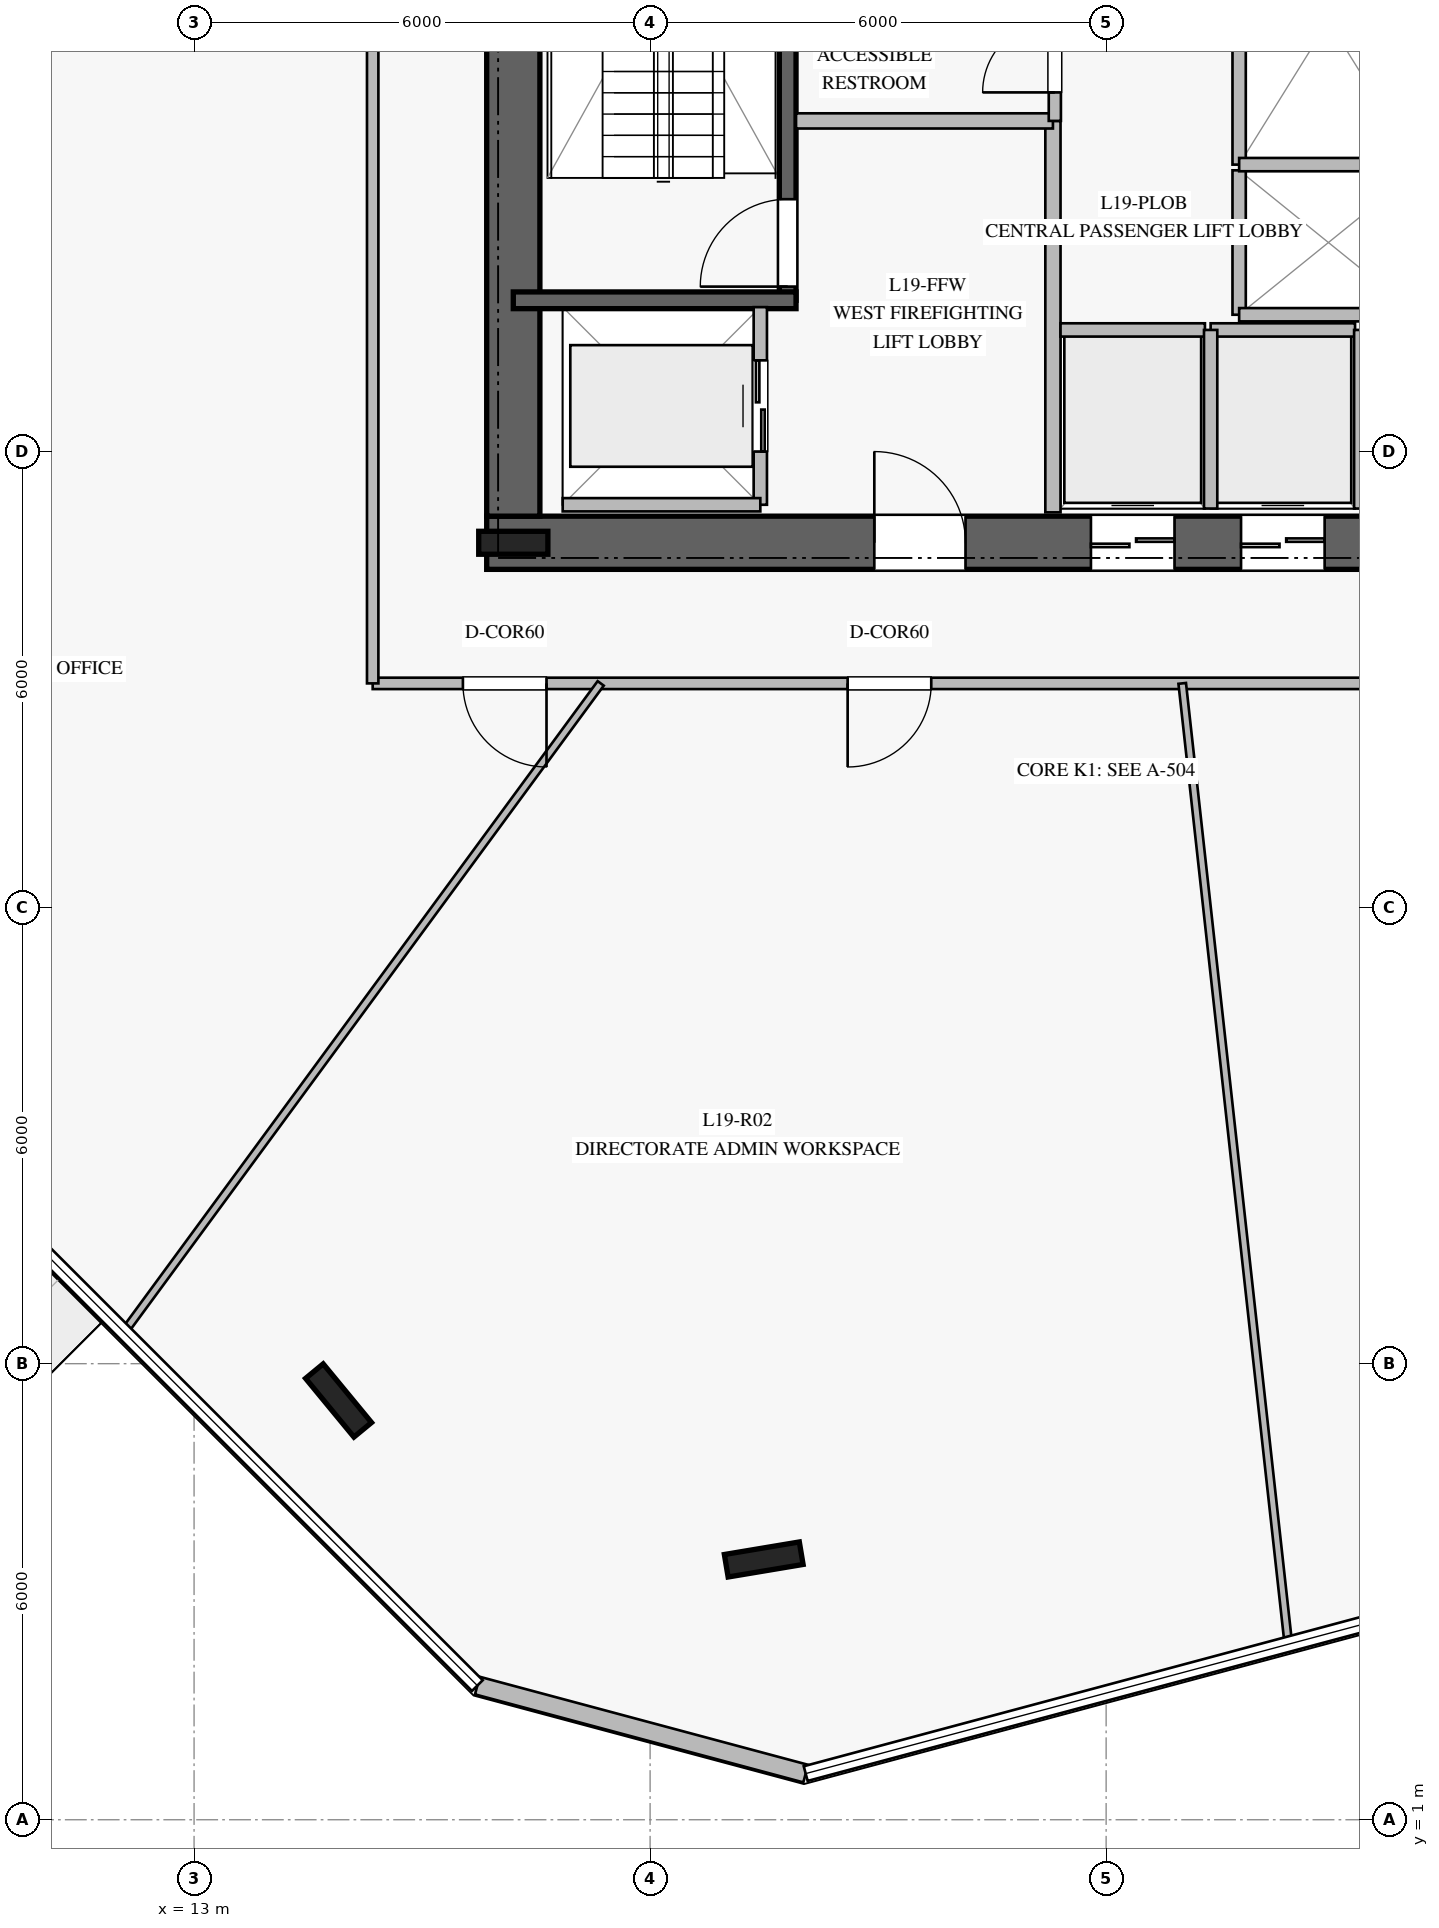
"""IFC4 building model, lengths in metres.
Left out: names, types, materials, properties, quantities, classifications, styles, units other than length and angle.
Written with IfcOpenShell. Run it as: python <this file> out.ifc"""

import sys

from ifc_helpers import new_model, si_unit, direction, frame, frame_2d, origin, origin_2d, place, context, subcontext, project, spatial, rectangle, i_section, extrude, element, fill, save


model = new_model("IFC4")
c1 = context("Model", 3, precision=1e-05, world=origin(), true_north=direction((0.0, 1.0)))
c2 = subcontext(c1, "Body", "Model", "MODEL_VIEW")
j1 = project(units=[si_unit("LENGTHUNIT", "METRE"), si_unit("PLANEANGLEUNIT", "RADIAN")], contexts=[c1])
p1 = place(None, origin())
s1 = spatial("IfcSite", under=j1, at=p1, CompositionType="ELEMENT")
p2 = place(p1, origin())
s2 = spatial("IfcBuilding", under=s1, at=p2, CompositionType="ELEMENT")
p3 = place(p2, frame((0.0, 0.0, 80.0)))
s3 = spatial("IfcBuildingStorey", under=s2, at=p3, CompositionType="ELEMENT", Elevation=80.0)
p4 = place(p3, frame((16.85, 17.8, 0.0), z_axis=(0.0, 0.0, 1.0), x_axis=(1.0, 0.0, 0.0)))
e1 = element("IfcWall", 1, at=p4, inside=s3, PredefinedType="SHEAR", context=c2, shape_type="SweptSolid", body=[
    extrude(rectangle(XDim=16.3, YDim=0.7, at=frame_2d((8.15, 0.0))), origin(), (0.0, 0.0, 1.0), 3.76),
])
p5 = place(p4, frame((5.1, 0.0, 0.0)))
e2 = element("IfcOpeningElement", 2, at=p5, cuts=e1, PredefinedType="OPENING", context=c2, shape_type="SweptSolid", body=[
    extrude(rectangle(XDim=1.2, YDim=2.25, at=frame_2d((0.6, 1.125))), frame((0.0, 0.36, 0.0), z_axis=(0.0, -1.0, 0.0), x_axis=(1.0, 0.0, 0.0)), (0.0, 0.0, 1.0), 0.72),
])
p6 = place(p4, frame((14.05, 0.0, 0.0)))
e3 = element("IfcOpeningElement", 3, at=p6, cuts=e1, PredefinedType="OPENING", context=c2, shape_type="SweptSolid", body=[
    extrude(rectangle(XDim=0.9, YDim=2.1, at=frame_2d((0.45, 1.05))), frame((0.0, 0.36, 0.0), z_axis=(0.0, -1.0, 0.0), x_axis=(1.0, 0.0, 0.0)), (0.0, 0.0, 1.0), 0.72),
])
p7 = place(p4, frame((7.95, 0.0, 0.0)))
e4 = element("IfcOpeningElement", 4, at=p7, cuts=e1, PredefinedType="OPENING", context=c2, shape_type="SweptSolid", body=[
    extrude(rectangle(XDim=1.1, YDim=2.2, at=frame_2d((0.55, 1.1))), frame((0.0, 0.36, 0.0), z_axis=(0.0, -1.0, 0.0), x_axis=(1.0, 0.0, 0.0)), (0.0, 0.0, 1.0), 0.72),
])
p8 = place(p4, frame((9.925, 0.0, 0.0)))
e5 = element("IfcOpeningElement", 5, at=p8, cuts=e1, PredefinedType="OPENING", context=c2, shape_type="SweptSolid", body=[
    extrude(rectangle(XDim=1.1, YDim=2.2, at=frame_2d((0.55, 1.1))), frame((0.0, 0.36, 0.0), z_axis=(0.0, -1.0, 0.0), x_axis=(1.0, 0.0, 0.0)), (0.0, 0.0, 1.0), 0.72),
])
p9 = place(p4, frame((11.9, 0.0, 0.0)))
e6 = element("IfcOpeningElement", 6, at=p9, cuts=e1, PredefinedType="OPENING", context=c2, shape_type="SweptSolid", body=[
    extrude(rectangle(XDim=1.1, YDim=2.2, at=frame_2d((0.55, 1.1))), frame((0.0, 0.36, 0.0), z_axis=(0.0, -1.0, 0.0), x_axis=(1.0, 0.0, 0.0)), (0.0, 0.0, 1.0), 0.72),
])
p10 = place(p3, frame((17.2, 31.85, 0.0), z_axis=(0.0, 0.0, 1.0), x_axis=(0.0, -1.0, 0.0)))
e7 = element("IfcWall", 7, at=p10, inside=s3, PredefinedType="SHEAR", context=c2, shape_type="SweptSolid", body=[
    extrude(rectangle(XDim=13.7, YDim=0.7, at=frame_2d((6.85, 0.0))), origin(), (0.0, 0.0, 1.0), 3.76),
])
p11 = place(p10, frame((2.0, 0.0, 0.0)))
e8 = element("IfcOpeningElement", 8, at=p11, cuts=e7, PredefinedType="OPENING", context=c2, shape_type="SweptSolid", body=[
    extrude(rectangle(XDim=1.5, YDim=2.2, at=frame_2d((0.75, 1.1))), frame((0.0, 0.36, 0.0), z_axis=(0.0, -1.0, 0.0), x_axis=(1.0, 0.0, 0.0)), (0.0, 0.0, 1.0), 0.72),
])
p12 = place(p3, frame((17.2, 17.8, 0.0), z_axis=(0.0, 0.0, 1.0), x_axis=(1.0, 0.0, 0.0)))
e9 = element("IfcColumn", 9, at=p12, inside=s3, PredefinedType="COLUMN", context=c2, shape_type="SweptSolid", body=[
    extrude(i_section(OverallWidth=0.302, OverallDepth=0.91, WebThickness=0.021, FlangeThickness=0.04, at=origin_2d()), origin(), (0.0, 0.0, 1.0), 4.0),
])
p13 = place(p3, frame((20.81, 20.99, 0.0), z_axis=(0.0, 0.0, 1.0), x_axis=(0.0, 1.0, 0.0)))
e10 = element("IfcWall", 10, at=p13, inside=s3, PredefinedType="SOLIDWALL", context=c2, shape_type="SweptSolid", body=[
    extrude(rectangle(XDim=7.22, YDim=0.22, at=frame_2d((3.61, 0.0))), origin(), (0.0, 0.0, 1.0), 3.76),
])
p14 = place(p13, frame((0.18, 0.0, 0.0)))
e11 = element("IfcOpeningElement", 11, at=p14, cuts=e10, PredefinedType="OPENING", context=c2, shape_type="SweptSolid", body=[
    extrude(rectangle(XDim=1.15, YDim=2.2, at=frame_2d((0.575, 1.1))), frame((0.0, 0.12, 0.0), z_axis=(0.0, -1.0, 0.0), x_axis=(1.0, 0.0, 0.0)), (0.0, 0.0, 1.0), 0.24),
])
p15 = place(p3, frame((17.2, 20.99, 0.0), z_axis=(0.0, 0.0, 1.0), x_axis=(1.0, 0.0, 0.0)))
e12 = element("IfcWall", 12, at=p15, inside=s3, PredefinedType="SOLIDWALL", context=c2, shape_type="SweptSolid", body=[
    extrude(rectangle(XDim=3.72, YDim=0.22, at=frame_2d((1.86, 0.0))), origin(), (0.0, 0.0, 1.0), 3.76),
])
for number, where, z_axis, x_axis in (
    (13, (14.901, 6.516, 0.0), (0.0, 0.0, 1.0), (-0.636, 0.772, 0.0)),
    (14, (20.495, 4.424, 0.0), (0.0, 0.0, 1.0), (0.986, 0.165, 0.0)),
):
    element("IfcColumn", number, at=place(p3, frame(where, z_axis=z_axis, x_axis=x_axis)), inside=s3, PredefinedType="COLUMN", context=c2, shape_type="SweptSolid", body=[
        extrude(i_section(OverallWidth=0.3, OverallDepth=1.0, WebThickness=0.019, FlangeThickness=0.036, at=origin_2d()), origin(), (0.0, 0.0, 1.0), 4.0),
    ])
p16 = place(p3, frame((16.727, 2.765, 0.0), z_axis=(0.0, 0.0, 1.0), x_axis=(0.965903455427, -0.258902519869, 0.0)))
e15 = element("IfcWall", 15, at=p16, inside=s3, PredefinedType="STANDARD", context=c2, shape_type="SweptSolid", body=[
    extrude(rectangle(XDim=4.473, YDim=0.24, at=frame_2d((2.236, 0.0))), origin(), (0.0, 0.0, 1.0), 3.76),
])
p17 = place(p3, frame((24.3, 18.2, 0.0), z_axis=(0.0, 0.0, 1.0), x_axis=(0.0, 1.0, 0.0)))
e16 = element("IfcWall", 16, at=p17, inside=s3, PredefinedType="PARTITIONING", context=c2, shape_type="SweptSolid", body=[
    extrude(rectangle(XDim=5.15, YDim=0.2, at=frame_2d((2.575, 0.0))), origin(), (0.0, 0.0, 1.0), 3.76),
])
p18 = place(p3, frame((20.92, 23.35, 0.0), z_axis=(0.0, 0.0, 1.0), x_axis=(1.0, 0.0, 0.0)))
e17 = element("IfcWall", 17, at=p18, inside=s3, PredefinedType="PARTITIONING", context=c2, shape_type="SweptSolid", body=[
    extrude(rectangle(XDim=3.38, YDim=0.2, at=frame_2d((1.69, 0.0))), origin(), (0.0, 0.0, 1.0), 3.76),
])
p19 = place(p3, frame((24.325, 23.35, 0.0), z_axis=(0.0, 0.0, 1.0), x_axis=(0.0, 1.0, 0.0)))
e18 = element("IfcWall", 18, at=p19, inside=s3, PredefinedType="PLUMBINGWALL", context=c2, shape_type="SweptSolid", body=[
    extrude(rectangle(XDim=4.93, YDim=0.16, at=frame_2d((2.465, 0.0))), origin(), (0.0, 0.0, 1.0), 3.76),
])
p20 = place(p19, frame((0.375, 0.0, 0.0)))
e19 = element("IfcOpeningElement", 19, at=p20, cuts=e18, PredefinedType="OPENING", context=c2, shape_type="SweptSolid", body=[
    extrude(rectangle(XDim=0.95, YDim=2.1, at=frame_2d((0.475, 1.05))), frame((0.0, 0.09, 0.0), z_axis=(0.0, -1.0, 0.0), x_axis=(1.0, 0.0, 0.0)), (0.0, 0.0, 1.0), 0.18),
])
p21 = place(p19, frame((2.035, 0.0, 0.0)))
e20 = element("IfcOpeningElement", 20, at=p21, cuts=e18, PredefinedType="OPENING", context=c2, shape_type="SweptSolid", body=[
    extrude(rectangle(XDim=0.9, YDim=2.1, at=frame_2d((0.45, 1.05))), frame((0.0, 0.09, 0.0), z_axis=(0.0, -1.0, 0.0), x_axis=(1.0, 0.0, 0.0)), (0.0, 0.0, 1.0), 0.18),
])
p22 = place(p19, frame((3.66, 0.0, 0.0)))
e21 = element("IfcOpeningElement", 21, at=p22, cuts=e18, PredefinedType="OPENING", context=c2, shape_type="SweptSolid", body=[
    extrude(rectangle(XDim=0.9, YDim=2.1, at=frame_2d((0.45, 1.05))), frame((0.0, 0.09, 0.0), z_axis=(0.0, -1.0, 0.0), x_axis=(1.0, 0.0, 0.0)), (0.0, 0.0, 1.0), 0.18),
])
p23 = place(p3, frame((24.4, 20.6, 0.0), z_axis=(0.0, 0.0, 1.0), x_axis=(1.0, 0.0, 0.0)))
e22 = element("IfcWall", 22, at=p23, inside=s3, PredefinedType="PARTITIONING", context=c2, shape_type="SweptSolid", body=[
    extrude(rectangle(XDim=1.9, YDim=0.175, at=frame_2d((0.95, 0.0))), origin(), (0.0, 0.0, 1.0), 3.76),
])
p24 = place(p3, frame((26.375, 20.6, 0.0), z_axis=(0.0, 0.0, 1.0), x_axis=(1.0, 0.0, 0.0)))
e23 = element("IfcWall", 23, at=p24, inside=s3, PredefinedType="PARTITIONING", context=c2, shape_type="SweptSolid", body=[
    extrude(rectangle(XDim=1.9, YDim=0.175, at=frame_2d((0.95, 0.0))), origin(), (0.0, 0.0, 1.0), 3.76),
])
for number, where, z_axis, x_axis in (
    (24, (26.375, 18.25, 0.0), (0.0, 0.0, 1.0), (0.0, 1.0, 0.0)),
    (25, (28.35, 18.25, 0.0), (0.0, 0.0, 1.0), (0.0, 1.0, 0.0)),
):
    element("IfcWall", number, at=place(p3, frame(where, z_axis=z_axis, x_axis=x_axis)), inside=s3, PredefinedType="PARTITIONING", context=c2, shape_type="SweptSolid", body=[
        extrude(rectangle(XDim=2.35, YDim=0.175, at=frame_2d((1.175, 0.0))), origin(), (0.0, 0.0, 1.0), 3.76),
    ])
p25 = place(p3, frame((26.75, 20.8, 0.0), z_axis=(0.0, 0.0, 1.0), x_axis=(0.0, 1.0, 0.0)))
e26 = element("IfcWall", 26, at=p25, inside=s3, PredefinedType="PARTITIONING", context=c2, shape_type="SweptSolid", body=[
    extrude(rectangle(XDim=1.9, YDim=0.175, at=frame_2d((0.95, 0.0))), origin(), (0.0, 0.0, 1.0), 3.76),
])
p26 = place(p3, frame((26.75, 20.8, 0.0), z_axis=(0.0, 0.0, 1.0), x_axis=(1.0, 0.0, 0.0)))
e27 = element("IfcWall", 27, at=p26, inside=s3, PredefinedType="PARTITIONING", context=c2, shape_type="SweptSolid", body=[
    extrude(rectangle(XDim=2.35, YDim=0.175, at=frame_2d((1.175, 0.0))), origin(), (0.0, 0.0, 1.0), 3.76),
])
p27 = place(p3, frame((26.75, 22.775, 0.0), z_axis=(0.0, 0.0, 1.0), x_axis=(0.0, 1.0, 0.0)))
e28 = element("IfcWall", 28, at=p27, inside=s3, PredefinedType="PARTITIONING", context=c2, shape_type="SweptSolid", body=[
    extrude(rectangle(XDim=1.9, YDim=0.175, at=frame_2d((0.95, 0.0))), origin(), (0.0, 0.0, 1.0), 3.76),
])
p28 = place(p3, frame((26.75, 22.775, 0.0), z_axis=(0.0, 0.0, 1.0), x_axis=(1.0, 0.0, 0.0)))
e29 = element("IfcWall", 29, at=p28, inside=s3, PredefinedType="PARTITIONING", context=c2, shape_type="SweptSolid", body=[
    extrude(rectangle(XDim=2.35, YDim=0.175, at=frame_2d((1.175, 0.0))), origin(), (0.0, 0.0, 1.0), 3.76),
])
p29 = place(p3, frame((20.45, 18.3, 0.0), z_axis=(0.0, 0.0, 1.0), x_axis=(0.0, 1.0, 0.0)))
e30 = element("IfcWall", 30, at=p29, inside=s3, PredefinedType="PARTITIONING", context=c2, shape_type="SweptSolid", body=[
    extrude(rectangle(XDim=2.6, YDim=0.175, at=frame_2d((1.3, 0.0))), origin(), (0.0, 0.0, 1.0), 3.76),
])
p30 = place(p29, frame((0.7, 0.0, 0.0)))
e31 = element("IfcOpeningElement", 31, at=p30, cuts=e30, PredefinedType="OPENING", context=c2, shape_type="SweptSolid", body=[
    extrude(rectangle(XDim=1.2, YDim=2.2, at=frame_2d((0.6, 1.1))), frame((0.0, 0.098, 0.0), z_axis=(0.0, -1.0, 0.0), x_axis=(1.0, 0.0, 0.0)), (0.0, 0.0, 1.0), 0.195),
])
p31 = place(p3, frame((17.85, 18.3, 0.0), z_axis=(0.0, 0.0, 1.0), x_axis=(1.0, 0.0, 0.0)))
e32 = element("IfcWall", 32, at=p31, inside=s3, PredefinedType="PARTITIONING", context=c2, shape_type="SweptSolid", body=[
    extrude(rectangle(XDim=2.6, YDim=0.175, at=frame_2d((1.3, 0.0))), origin(), (0.0, 0.0, 1.0), 3.76),
])
p32 = place(p3, frame((34.65, 15.95, 0.0), z_axis=(0.0, 0.0, 1.0), x_axis=(-1.0, 0.0, 0.0)))
e33 = element("IfcWall", 33, at=p32, inside=s3, PredefinedType="PARTITIONING", context=c2, shape_type="SweptSolid", body=[
    extrude(rectangle(XDim=19.3, YDim=0.15, at=frame_2d((9.65, 0.0))), origin(), (0.0, 0.0, 1.0), 3.21),
])
p33 = place(p32, frame((17.013, 0.0, 0.0)))
e34 = element("IfcOpeningElement", 34, at=p33, cuts=e33, PredefinedType="OPENING", context=c2, shape_type="SweptSolid", body=[
    extrude(rectangle(XDim=1.1, YDim=2.2, at=frame_2d((0.55, 1.1))), frame((0.0, 0.085, 0.0), z_axis=(0.0, -1.0, 0.0), x_axis=(1.0, 0.0, 0.0)), (0.0, 0.0, 1.0), 0.17),
])
p34 = place(p32, frame((11.951, 0.0, 0.0)))
e35 = element("IfcOpeningElement", 35, at=p34, cuts=e33, PredefinedType="OPENING", context=c2, shape_type="SweptSolid", body=[
    extrude(rectangle(XDim=1.1, YDim=2.2, at=frame_2d((0.55, 1.1))), frame((0.0, 0.085, 0.0), z_axis=(0.0, -1.0, 0.0), x_axis=(1.0, 0.0, 0.0)), (0.0, 0.0, 1.0), 0.17),
])
p35 = place(p3, frame((15.35, 15.95, 0.0), z_axis=(0.0, 0.0, 1.0), x_axis=(0.0, 1.0, 0.0)))
e36 = element("IfcWall", 36, at=p35, inside=s3, PredefinedType="PARTITIONING", context=c2, shape_type="SweptSolid", body=[
    extrude(rectangle(XDim=18.1, YDim=0.15, at=frame_2d((9.05, 0.0))), origin(), (0.0, 0.0, 1.0), 3.21),
])
p36 = place(p35, frame((12.932, 0.0, 0.0)))
e37 = element("IfcOpeningElement", 37, at=p36, cuts=e36, PredefinedType="OPENING", context=c2, shape_type="SweptSolid", body=[
    extrude(rectangle(XDim=1.1, YDim=2.2, at=frame_2d((0.55, 1.1))), frame((0.0, 0.085, 0.0), z_axis=(0.0, -1.0, 0.0), x_axis=(1.0, 0.0, 0.0)), (0.0, 0.0, 1.0), 0.17),
])
p37 = place(p3, frame((18.35, 15.95, 0.0), z_axis=(0.0, 0.0, 1.0), x_axis=(-0.592192095979, -0.805796823932, 0.0)))
e38 = element("IfcWall", 38, at=p37, inside=s3, PredefinedType="MOVABLE", context=c2, shape_type="SweptSolid", body=[
    extrude(rectangle(XDim=10.575, YDim=0.1, at=frame_2d((5.287, 0.0))), origin(), (0.0, 0.0, 1.0), 3.05),
])
p38 = place(p3, frame((26.001, 15.95, 0.0), z_axis=(0.0, 0.0, 1.0), x_axis=(0.109844945692, -0.993948735049, 0.0)))
e39 = element("IfcWall", 39, at=p38, inside=s3, PredefinedType="MOVABLE", context=c2, shape_type="SweptSolid", body=[
    extrude(rectangle(XDim=12.7, YDim=0.1, at=frame_2d((6.35, 0.0))), origin(), (0.0, 0.0, 1.0), 3.06),
])
p39 = place(p14, origin())
e40 = element("IfcDoor", 40, at=p39, inside=s3, OperationType="SINGLE_SWING_LEFT", PredefinedType="DOOR", context=c2, shape_type="SweptSolid", body=[
    extrude(rectangle(XDim=1.15, YDim=2.2, at=frame_2d((0.575, 1.1))), frame((0.0, 0.025, 0.0), z_axis=(0.0, -1.0, 0.0), x_axis=(1.0, 0.0, 0.0)), (0.0, 0.0, 1.0), 0.05),
])
fill(e11, e40)
p40 = place(p5, origin())
e41 = element("IfcDoor", 41, at=p40, inside=s3, OperationType="SINGLE_SWING_LEFT", PredefinedType="DOOR", context=c2, shape_type="SweptSolid", body=[
    extrude(rectangle(XDim=1.2, YDim=2.25, at=frame_2d((0.6, 1.125))), frame((0.0, 0.025, 0.0), z_axis=(0.0, -1.0, 0.0), x_axis=(1.0, 0.0, 0.0)), (0.0, 0.0, 1.0), 0.05),
])
fill(e2, e41)
p41 = place(p20, origin())
e42 = element("IfcDoor", 42, at=p41, inside=s3, OperationType="SINGLE_SWING_LEFT", PredefinedType="DOOR", context=c2, shape_type="SweptSolid", body=[
    extrude(rectangle(XDim=0.95, YDim=2.1, at=frame_2d((0.475, 1.05))), frame((0.0, 0.025, 0.0), z_axis=(0.0, -1.0, 0.0), x_axis=(1.0, 0.0, 0.0)), (0.0, 0.0, 1.0), 0.05),
])
fill(e19, e42)
p42 = place(p7, origin())
e43 = element("IfcDoor", 43, at=p42, inside=s3, OperationType="DOUBLE_DOOR_SLIDING", PredefinedType="DOOR", context=c2, shape_type="SweptSolid", body=[
    extrude(rectangle(XDim=1.1, YDim=2.2, at=frame_2d((0.55, 1.1))), frame((0.0, 0.025, 0.0), z_axis=(0.0, -1.0, 0.0), x_axis=(1.0, 0.0, 0.0)), (0.0, 0.0, 1.0), 0.05),
])
fill(e4, e43)
p43 = place(p8, origin())
e44 = element("IfcDoor", 44, at=p43, inside=s3, OperationType="DOUBLE_DOOR_SLIDING", PredefinedType="DOOR", context=c2, shape_type="SweptSolid", body=[
    extrude(rectangle(XDim=1.1, YDim=2.2, at=frame_2d((0.55, 1.1))), frame((0.0, 0.025, 0.0), z_axis=(0.0, -1.0, 0.0), x_axis=(1.0, 0.0, 0.0)), (0.0, 0.0, 1.0), 0.05),
])
fill(e5, e44)
p44 = place(p30, origin())
e45 = element("IfcDoor", 45, at=p44, inside=s3, OperationType="DOUBLE_DOOR_SLIDING", PredefinedType="DOOR", context=c2, shape_type="SweptSolid", body=[
    extrude(rectangle(XDim=1.2, YDim=2.2, at=frame_2d((0.6, 1.1))), frame((0.0, 0.025, 0.0), z_axis=(0.0, -1.0, 0.0), x_axis=(1.0, 0.0, 0.0)), (0.0, 0.0, 1.0), 0.05),
])
fill(e31, e45)
p45 = place(p33, origin())
e46 = element("IfcDoor", 46, at=p45, inside=s3, OperationType="SINGLE_SWING_LEFT", PredefinedType="DOOR", context=c2, shape_type="SweptSolid", body=[
    extrude(rectangle(XDim=1.1, YDim=2.2, at=frame_2d((0.55, 1.1))), frame((0.0, 0.025, 0.0), z_axis=(0.0, -1.0, 0.0), x_axis=(1.0, 0.0, 0.0)), (0.0, 0.0, 1.0), 0.05),
])
fill(e34, e46)
p46 = place(p34, origin())
e47 = element("IfcDoor", 47, at=p46, inside=s3, OperationType="SINGLE_SWING_RIGHT", PredefinedType="DOOR", context=c2, shape_type="SweptSolid", body=[
    extrude(rectangle(XDim=1.1, YDim=2.2, at=frame_2d((0.55, 1.1))), frame((0.0, 0.025, 0.0), z_axis=(0.0, -1.0, 0.0), x_axis=(1.0, 0.0, 0.0)), (0.0, 0.0, 1.0), 0.05),
])
fill(e35, e47)
save(model, sys.argv[1])
